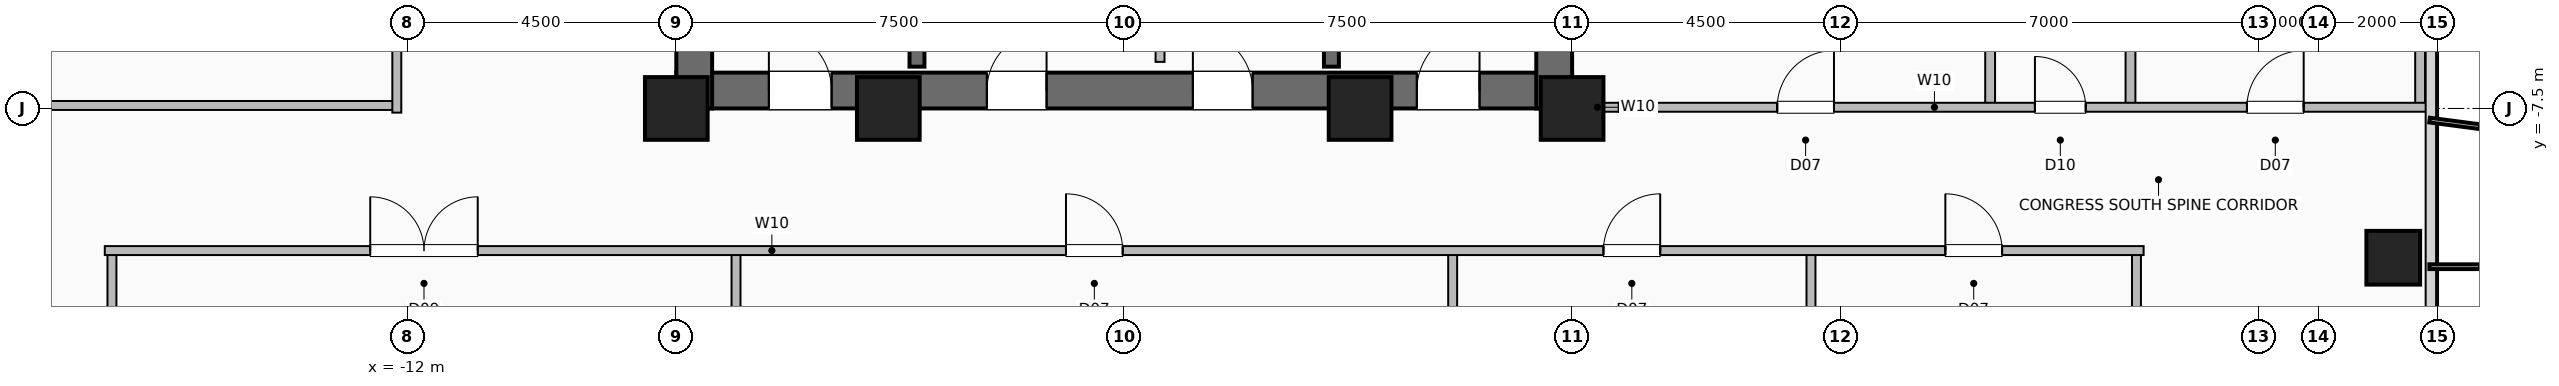
"""IFC4 building model, lengths in metres.
Left out: names, types, materials, properties, quantities, classifications, styles, units other than length and angle.
Written with IfcOpenShell. Run it as: python <this file> out.ifc"""

import sys

from ifc_helpers import new_model, si_unit, direction, frame, frame_2d, origin, origin_2d, place, context, subcontext, project, spatial, rectangle, hollow_rectangle, extrude, element, fill, save


model = new_model("IFC4")
c1 = context("Model", 3, precision=1e-05, world=origin(), true_north=direction((0.0, 1.0)))
c2 = subcontext(c1, "Body", "Model", "MODEL_VIEW")
j1 = project(units=[si_unit("LENGTHUNIT", "METRE"), si_unit("PLANEANGLEUNIT", "RADIAN")], contexts=[c1])
p1 = place(None, origin())
s1 = spatial("IfcSite", under=j1, at=p1, CompositionType="ELEMENT")
p2 = place(p1, origin())
s2 = spatial("IfcBuilding", under=s1, at=p2, CompositionType="ELEMENT")
p3 = place(p2, frame((0.0, 0.0, 126.4)))
s3 = spatial("IfcBuildingStorey", under=s2, at=p3, CompositionType="ELEMENT", Elevation=126.4)
for number, where, z_axis, x_axis in (
    (1, (-7.5, -7.5, 0.0), (0.0, 0.0, 1.0), (1.0, 0.0, 0.0)),
    (2, (-3.95, -7.5, 0.0), (0.0, 0.0, 1.0), (1.0, 0.0, 0.0)),
    (3, (3.95, -7.5, 0.0), (0.0, 0.0, 1.0), (1.0, 0.0, 0.0)),
    (4, (7.5, -7.5, 0.0), (0.0, 0.0, 1.0), (1.0, 0.0, 0.0)),
):
    element("IfcColumn", number, at=place(p3, frame(where, z_axis=z_axis, x_axis=x_axis)), inside=s3, PredefinedType="COLUMN", context=c2, shape_type="SweptSolid", body=[
        extrude(hollow_rectangle(XDim=1.05, YDim=1.05, WallThickness=0.05, at=origin_2d()), origin(), (0.0, 0.0, 1.0), 3.6),
    ])
p4 = place(p3, frame((21.25, -10.0, 0.0), z_axis=(0.0, 0.0, 1.0), x_axis=(1.0, 0.0, 0.0)))
e5 = element("IfcColumn", 5, at=p4, inside=s3, PredefinedType="COLUMN", context=c2, shape_type="SweptSolid", body=[
    extrude(hollow_rectangle(XDim=0.9, YDim=0.9, WallThickness=0.045, at=origin_2d()), origin(), (0.0, 0.0, 1.0), 3.6),
])
p5 = place(p3, frame((-7.5, -7.2, 0.0), z_axis=(0.0, 0.0, 1.0), x_axis=(1.0, 0.0, 0.0)))
e6 = element("IfcWall", 6, at=p5, inside=s3, PredefinedType="SHEAR", context=c2, shape_type="SweptSolid", body=[
    extrude(rectangle(XDim=15.0, YDim=0.6, at=frame_2d((7.5, 0.0))), origin(), (0.0, 0.0, 1.0), 3.36),
])
p6 = place(p5, frame((1.55, 0.0, 0.0)))
e7 = element("IfcOpeningElement", 7, at=p6, cuts=e6, PredefinedType="OPENING", context=c2, shape_type="SweptSolid", body=[
    extrude(rectangle(XDim=1.05, YDim=2.08, at=frame_2d((0.525, 1.04))), frame((0.0, 0.31, 0.0), z_axis=(0.0, -1.0, 0.0), x_axis=(1.0, 0.0, 0.0)), (0.0, 0.0, 1.0), 0.62),
])
p7 = place(p5, frame((12.4, 0.0, 0.0)))
e8 = element("IfcOpeningElement", 8, at=p7, cuts=e6, PredefinedType="OPENING", context=c2, shape_type="SweptSolid", body=[
    extrude(rectangle(XDim=1.05, YDim=2.08, at=frame_2d((0.525, 1.04))), frame((0.0, 0.31, 0.0), z_axis=(0.0, -1.0, 0.0), x_axis=(1.0, 0.0, 0.0)), (0.0, 0.0, 1.0), 0.62),
])
p8 = place(p5, frame((5.2, 0.0, 0.0)))
e9 = element("IfcOpeningElement", 9, at=p8, cuts=e6, PredefinedType="OPENING", context=c2, shape_type="SweptSolid", body=[
    extrude(rectangle(XDim=1.0, YDim=2.08, at=frame_2d((0.5, 1.04))), frame((0.0, 0.31, 0.0), z_axis=(0.0, -1.0, 0.0), x_axis=(1.0, 0.0, 0.0)), (0.0, 0.0, 1.0), 0.62),
])
p9 = place(p5, frame((8.65, 0.0, 0.0)))
e10 = element("IfcOpeningElement", 10, at=p9, cuts=e6, PredefinedType="OPENING", context=c2, shape_type="SweptSolid", body=[
    extrude(rectangle(XDim=1.0, YDim=2.08, at=frame_2d((0.5, 1.04))), frame((0.0, 0.31, 0.0), z_axis=(0.0, -1.0, 0.0), x_axis=(1.0, 0.0, 0.0)), (0.0, 0.0, 1.0), 0.62),
])
p10 = place(p3, frame((-7.2, -7.5, 0.0), z_axis=(0.0, 0.0, 1.0), x_axis=(0.0, 1.0, 0.0)))
e11 = element("IfcWall", 11, at=p10, inside=s3, PredefinedType="SHEAR", context=c2, shape_type="SweptSolid", body=[
    extrude(rectangle(XDim=15.0, YDim=0.6, at=frame_2d((7.5, 0.0))), origin(), (0.0, 0.0, 1.0), 3.36),
])
p11 = place(p10, frame((9.5, 0.0, 0.0)))
e12 = element("IfcOpeningElement", 12, at=p11, cuts=e11, PredefinedType="OPENING", context=c2, shape_type="SweptSolid", body=[
    extrude(rectangle(XDim=1.0, YDim=2.08, at=frame_2d((0.5, 1.04))), frame((0.0, 0.31, 0.0), z_axis=(0.0, -1.0, 0.0), x_axis=(1.0, 0.0, 0.0)), (0.0, 0.0, 1.0), 0.62),
])
p12 = place(p3, frame((7.2, -7.5, 0.0), z_axis=(0.0, 0.0, 1.0), x_axis=(0.0, 1.0, 0.0)))
e13 = element("IfcWall", 13, at=p12, inside=s3, PredefinedType="SHEAR", context=c2, shape_type="SweptSolid", body=[
    extrude(rectangle(XDim=15.0, YDim=0.6, at=frame_2d((7.5, 0.0))), origin(), (0.0, 0.0, 1.0), 3.36),
])
for number, where, z_axis, x_axis in (
    (14, (-3.47, -6.8, 0.0), (0.0, 0.0, 1.0), (0.0, 1.0, 0.0)),
    (15, (3.47, -6.8, 0.0), (0.0, 0.0, 1.0), (0.0, 1.0, 0.0)),
):
    element("IfcWall", number, at=place(p3, frame(where, z_axis=z_axis, x_axis=x_axis)), inside=s3, PredefinedType="SHEAR", context=c2, shape_type="SweptSolid", body=[
        extrude(rectangle(XDim=7.72, YDim=0.25, at=frame_2d((3.86, 0.0))), origin(), (0.0, 0.0, 1.0), 3.36),
    ])
p13 = place(p3, frame((0.6, -6.72, 0.0), z_axis=(0.0, 0.0, 1.0), x_axis=(0.0, 1.0, 0.0)))
e16 = element("IfcWall", 16, at=p13, inside=s3, PredefinedType="PARTITIONING", context=c2, shape_type="SweptSolid", body=[
    extrude(rectangle(XDim=4.29, YDim=0.15, at=frame_2d((2.145, 0.0))), origin(), (0.0, 0.0, 1.0), 3.36),
])
for number, where, z_axis, x_axis in (
    (17, (-16.95, -21.82, 0.0), (0.0, 0.0, 1.0), (0.0, 1.0, 0.0)),
    (18, (-6.5, -21.82, 0.0), (0.0, 0.0, 1.0), (0.0, 1.0, 0.0)),
    (19, (5.5, -21.82, 0.0), (0.0, 0.0, 1.0), (0.0, 1.0, 0.0)),
    (20, (11.5, -21.82, 0.0), (0.0, 0.0, 1.0), (0.0, 1.0, 0.0)),
    (21, (16.95, -21.82, 0.0), (0.0, 0.0, 1.0), (0.0, 1.0, 0.0)),
):
    element("IfcWall", number, at=place(p3, frame(where, z_axis=z_axis, x_axis=x_axis)), inside=s3, PredefinedType="PARTITIONING", context=c2, shape_type="SweptSolid", body=[
        extrude(rectangle(XDim=11.94, YDim=0.15, at=frame_2d((5.97, 0.0))), origin(), (0.0, 0.0, 1.0), 3.36),
    ])
p14 = place(p3, frame((-17.07, -9.88, 0.0), z_axis=(0.0, 0.0, 1.0), x_axis=(1.0, 0.0, 0.0)))
e22 = element("IfcWall", 22, at=p14, inside=s3, PredefinedType="PARTITIONING", context=c2, shape_type="SweptSolid", body=[
    extrude(rectangle(XDim=34.14, YDim=0.15, at=frame_2d((17.07, 0.0))), origin(), (0.0, 0.0, 1.0), 3.36),
])
p15 = place(p14, frame((4.445, 0.0, 0.0)))
e23 = element("IfcOpeningElement", 23, at=p15, cuts=e22, PredefinedType="OPENING", context=c2, shape_type="SweptSolid", body=[
    extrude(rectangle(XDim=1.8, YDim=2.08, at=frame_2d((0.9, 1.04))), frame((0.0, 0.085, 0.0), z_axis=(0.0, -1.0, 0.0), x_axis=(1.0, 0.0, 0.0)), (0.0, 0.0, 1.0), 0.17),
])
p16 = place(p14, frame((16.095, 0.0, 0.0)))
e24 = element("IfcOpeningElement", 24, at=p16, cuts=e22, PredefinedType="OPENING", context=c2, shape_type="SweptSolid", body=[
    extrude(rectangle(XDim=0.95, YDim=2.06, at=frame_2d((0.475, 1.03))), frame((0.0, 0.085, 0.0), z_axis=(0.0, -1.0, 0.0), x_axis=(1.0, 0.0, 0.0)), (0.0, 0.0, 1.0), 0.17),
])
p17 = place(p14, frame((25.095, 0.0, 0.0)))
e25 = element("IfcOpeningElement", 25, at=p17, cuts=e22, PredefinedType="OPENING", context=c2, shape_type="SweptSolid", body=[
    extrude(rectangle(XDim=0.95, YDim=2.06, at=frame_2d((0.475, 1.03))), frame((0.0, 0.085, 0.0), z_axis=(0.0, -1.0, 0.0), x_axis=(1.0, 0.0, 0.0)), (0.0, 0.0, 1.0), 0.17),
])
p18 = place(p14, frame((30.82, 0.0, 0.0)))
e26 = element("IfcOpeningElement", 26, at=p18, cuts=e22, PredefinedType="OPENING", context=c2, shape_type="SweptSolid", body=[
    extrude(rectangle(XDim=0.95, YDim=2.06, at=frame_2d((0.475, 1.03))), frame((0.0, 0.085, 0.0), z_axis=(0.0, -1.0, 0.0), x_axis=(1.0, 0.0, 0.0)), (0.0, 0.0, 1.0), 0.17),
])
p19 = place(p3, frame((-21.82, -7.45, 0.0), z_axis=(0.0, 0.0, 1.0), x_axis=(1.0, 0.0, 0.0)))
e27 = element("IfcWall", 27, at=p19, inside=s3, PredefinedType="PARTITIONING", context=c2, shape_type="SweptSolid", body=[
    extrude(rectangle(XDim=9.64, YDim=0.15, at=frame_2d((4.82, 0.0))), origin(), (0.0, 0.0, 1.0), 3.36),
])
p20 = place(p3, frame((-12.18, -7.57, 0.0), z_axis=(0.0, 0.0, 1.0), x_axis=(0.0, 1.0, 0.0)))
e28 = element("IfcWall", 28, at=p20, inside=s3, PredefinedType="PARTITIONING", context=c2, shape_type="SweptSolid", body=[
    extrude(rectangle(XDim=15.14, YDim=0.15, at=frame_2d((7.57, 0.0))), origin(), (0.0, 0.0, 1.0), 3.36),
])
p21 = place(p20, frame((3.695, 0.0, 0.0)))
e29 = element("IfcOpeningElement", 29, at=p21, cuts=e28, PredefinedType="OPENING", context=c2, shape_type="SweptSolid", body=[
    extrude(rectangle(XDim=1.8, YDim=2.08, at=frame_2d((0.9, 1.04))), frame((0.0, 0.085, 0.0), z_axis=(0.0, -1.0, 0.0), x_axis=(1.0, 0.0, 0.0)), (0.0, 0.0, 1.0), 0.17),
])
p22 = place(p20, frame((11.57, 0.0, 0.0)))
e30 = element("IfcOpeningElement", 30, at=p22, cuts=e28, PredefinedType="OPENING", context=c2, shape_type="SweptSolid", body=[
    extrude(rectangle(XDim=0.95, YDim=2.06, at=frame_2d((0.475, 1.03))), frame((0.0, 0.085, 0.0), z_axis=(0.0, -1.0, 0.0), x_axis=(1.0, 0.0, 0.0)), (0.0, 0.0, 1.0), 0.17),
])
p23 = place(p3, frame((7.45, -7.48, 0.0), z_axis=(0.0, 0.0, 1.0), x_axis=(1.0, 0.0, 0.0)))
e31 = element("IfcWall", 31, at=p23, inside=s3, PredefinedType="PARTITIONING", context=c2, shape_type="SweptSolid", body=[
    extrude(rectangle(XDim=0.95, YDim=0.15, at=frame_2d((0.475, 0.0))), origin(), (0.0, 0.0, 1.0), 3.36),
])
for number, where, z_axis, x_axis in (
    (32, (16.85, -7.48, 0.0), (0.0, 0.0, 1.0), (0.0, 1.0, 0.0)),
    (33, (14.5, -7.48, 0.0), (0.0, 0.0, 1.0), (0.0, 1.0, 0.0)),
    (34, (21.7, -7.48, 0.0), (0.0, 0.0, 1.0), (0.0, 1.0, 0.0)),
):
    element("IfcWall", number, at=place(p3, frame(where, z_axis=z_axis, x_axis=x_axis)), inside=s3, PredefinedType="PLUMBINGWALL", context=c2, shape_type="SweptSolid", body=[
        extrude(rectangle(XDim=14.88, YDim=0.165, at=frame_2d((7.44, 0.0))), origin(), (0.0, 0.0, 1.0), 3.36),
    ])
p24 = place(p3, frame((8.28, -7.48, 0.0), z_axis=(0.0, 0.0, 1.0), x_axis=(1.0, 0.0, 0.0)))
e35 = element("IfcWall", 35, at=p24, inside=s3, PredefinedType="PARTITIONING", context=c2, shape_type="SweptSolid", body=[
    extrude(rectangle(XDim=13.54, YDim=0.15, at=frame_2d((6.77, 0.0))), origin(), (0.0, 0.0, 1.0), 3.36),
])
p25 = place(p24, frame((2.655, 0.0, 0.0)))
e36 = element("IfcOpeningElement", 36, at=p25, cuts=e35, PredefinedType="OPENING", context=c2, shape_type="SweptSolid", body=[
    extrude(rectangle(XDim=0.95, YDim=2.06, at=frame_2d((0.475, 1.03))), frame((0.0, 0.085, 0.0), z_axis=(0.0, -1.0, 0.0), x_axis=(1.0, 0.0, 0.0)), (0.0, 0.0, 1.0), 0.17),
])
p26 = place(p24, frame((6.97, 0.0, 0.0)))
e37 = element("IfcOpeningElement", 37, at=p26, cuts=e35, PredefinedType="OPENING", context=c2, shape_type="SweptSolid", body=[
    extrude(rectangle(XDim=0.85, YDim=2.05, at=frame_2d((0.425, 1.025))), frame((0.0, 0.085, 0.0), z_axis=(0.0, -1.0, 0.0), x_axis=(1.0, 0.0, 0.0)), (0.0, 0.0, 1.0), 0.17),
])
p27 = place(p24, frame((10.52, 0.0, 0.0)))
e38 = element("IfcOpeningElement", 38, at=p27, cuts=e35, PredefinedType="OPENING", context=c2, shape_type="SweptSolid", body=[
    extrude(rectangle(XDim=0.95, YDim=2.06, at=frame_2d((0.475, 1.03))), frame((0.0, 0.085, 0.0), z_axis=(0.0, -1.0, 0.0), x_axis=(1.0, 0.0, 0.0)), (0.0, 0.0, 1.0), 0.17),
])
p28 = place(p6, origin())
e39 = element("IfcDoor", 39, at=p28, inside=s3, OperationType="SINGLE_SWING_LEFT", PredefinedType="DOOR", context=c2, shape_type="SweptSolid", body=[
    extrude(rectangle(XDim=1.05, YDim=2.08, at=frame_2d((0.525, 1.04))), frame((0.0, 0.025, 0.0), z_axis=(0.0, -1.0, 0.0), x_axis=(1.0, 0.0, 0.0)), (0.0, 0.0, 1.0), 0.05),
])
fill(e7, e39)
p29 = place(p7, origin())
e40 = element("IfcDoor", 40, at=p29, inside=s3, OperationType="SINGLE_SWING_RIGHT", PredefinedType="DOOR", context=c2, shape_type="SweptSolid", body=[
    extrude(rectangle(XDim=1.05, YDim=2.08, at=frame_2d((0.525, 1.04))), frame((0.0, 0.025, 0.0), z_axis=(0.0, -1.0, 0.0), x_axis=(1.0, 0.0, 0.0)), (0.0, 0.0, 1.0), 0.05),
])
fill(e8, e40)
p30 = place(p8, origin())
e41 = element("IfcDoor", 41, at=p30, inside=s3, OperationType="SINGLE_SWING_RIGHT", PredefinedType="DOOR", context=c2, shape_type="SweptSolid", body=[
    extrude(rectangle(XDim=1.0, YDim=2.08, at=frame_2d((0.5, 1.04))), frame((0.0, 0.025, 0.0), z_axis=(0.0, -1.0, 0.0), x_axis=(1.0, 0.0, 0.0)), (0.0, 0.0, 1.0), 0.05),
])
fill(e9, e41)
p31 = place(p9, origin())
e42 = element("IfcDoor", 42, at=p31, inside=s3, OperationType="SINGLE_SWING_LEFT", PredefinedType="DOOR", context=c2, shape_type="SweptSolid", body=[
    extrude(rectangle(XDim=1.0, YDim=2.08, at=frame_2d((0.5, 1.04))), frame((0.0, 0.025, 0.0), z_axis=(0.0, -1.0, 0.0), x_axis=(1.0, 0.0, 0.0)), (0.0, 0.0, 1.0), 0.05),
])
fill(e10, e42)
p32 = place(p15, origin())
e43 = element("IfcDoor", 43, at=p32, inside=s3, OperationType="DOUBLE_DOOR_SINGLE_SWING", PredefinedType="DOOR", context=c2, shape_type="SweptSolid", body=[
    extrude(rectangle(XDim=1.8, YDim=2.08, at=frame_2d((0.9, 1.04))), frame((0.0, 0.025, 0.0), z_axis=(0.0, -1.0, 0.0), x_axis=(1.0, 0.0, 0.0)), (0.0, 0.0, 1.0), 0.05),
])
fill(e23, e43)
p33 = place(p16, origin())
e44 = element("IfcDoor", 44, at=p33, inside=s3, OperationType="SINGLE_SWING_LEFT", PredefinedType="DOOR", context=c2, shape_type="SweptSolid", body=[
    extrude(rectangle(XDim=0.95, YDim=2.06, at=frame_2d((0.475, 1.03))), frame((0.0, 0.025, 0.0), z_axis=(0.0, -1.0, 0.0), x_axis=(1.0, 0.0, 0.0)), (0.0, 0.0, 1.0), 0.05),
])
fill(e24, e44)
p34 = place(p17, origin())
e45 = element("IfcDoor", 45, at=p34, inside=s3, OperationType="SINGLE_SWING_RIGHT", PredefinedType="DOOR", context=c2, shape_type="SweptSolid", body=[
    extrude(rectangle(XDim=0.95, YDim=2.06, at=frame_2d((0.475, 1.03))), frame((0.0, 0.025, 0.0), z_axis=(0.0, -1.0, 0.0), x_axis=(1.0, 0.0, 0.0)), (0.0, 0.0, 1.0), 0.05),
])
fill(e25, e45)
p35 = place(p18, origin())
e46 = element("IfcDoor", 46, at=p35, inside=s3, OperationType="SINGLE_SWING_LEFT", PredefinedType="DOOR", context=c2, shape_type="SweptSolid", body=[
    extrude(rectangle(XDim=0.95, YDim=2.06, at=frame_2d((0.475, 1.03))), frame((0.0, 0.025, 0.0), z_axis=(0.0, -1.0, 0.0), x_axis=(1.0, 0.0, 0.0)), (0.0, 0.0, 1.0), 0.05),
])
fill(e26, e46)
p36 = place(p25, origin())
e47 = element("IfcDoor", 47, at=p36, inside=s3, OperationType="SINGLE_SWING_RIGHT", PredefinedType="DOOR", context=c2, shape_type="SweptSolid", body=[
    extrude(rectangle(XDim=0.95, YDim=2.06, at=frame_2d((0.475, 1.03))), frame((0.0, 0.025, 0.0), z_axis=(0.0, -1.0, 0.0), x_axis=(1.0, 0.0, 0.0)), (0.0, 0.0, 1.0), 0.05),
])
fill(e36, e47)
p37 = place(p26, origin())
e48 = element("IfcDoor", 48, at=p37, inside=s3, OperationType="SINGLE_SWING_LEFT", PredefinedType="DOOR", context=c2, shape_type="SweptSolid", body=[
    extrude(rectangle(XDim=0.85, YDim=2.05, at=frame_2d((0.425, 1.025))), frame((0.0, 0.025, 0.0), z_axis=(0.0, -1.0, 0.0), x_axis=(1.0, 0.0, 0.0)), (0.0, 0.0, 1.0), 0.05),
])
fill(e37, e48)
p38 = place(p27, origin())
e49 = element("IfcDoor", 49, at=p38, inside=s3, OperationType="SINGLE_SWING_RIGHT", PredefinedType="DOOR", context=c2, shape_type="SweptSolid", body=[
    extrude(rectangle(XDim=0.95, YDim=2.06, at=frame_2d((0.475, 1.03))), frame((0.0, 0.025, 0.0), z_axis=(0.0, -1.0, 0.0), x_axis=(1.0, 0.0, 0.0)), (0.0, 0.0, 1.0), 0.05),
])
fill(e38, e49)
save(model, sys.argv[1])
